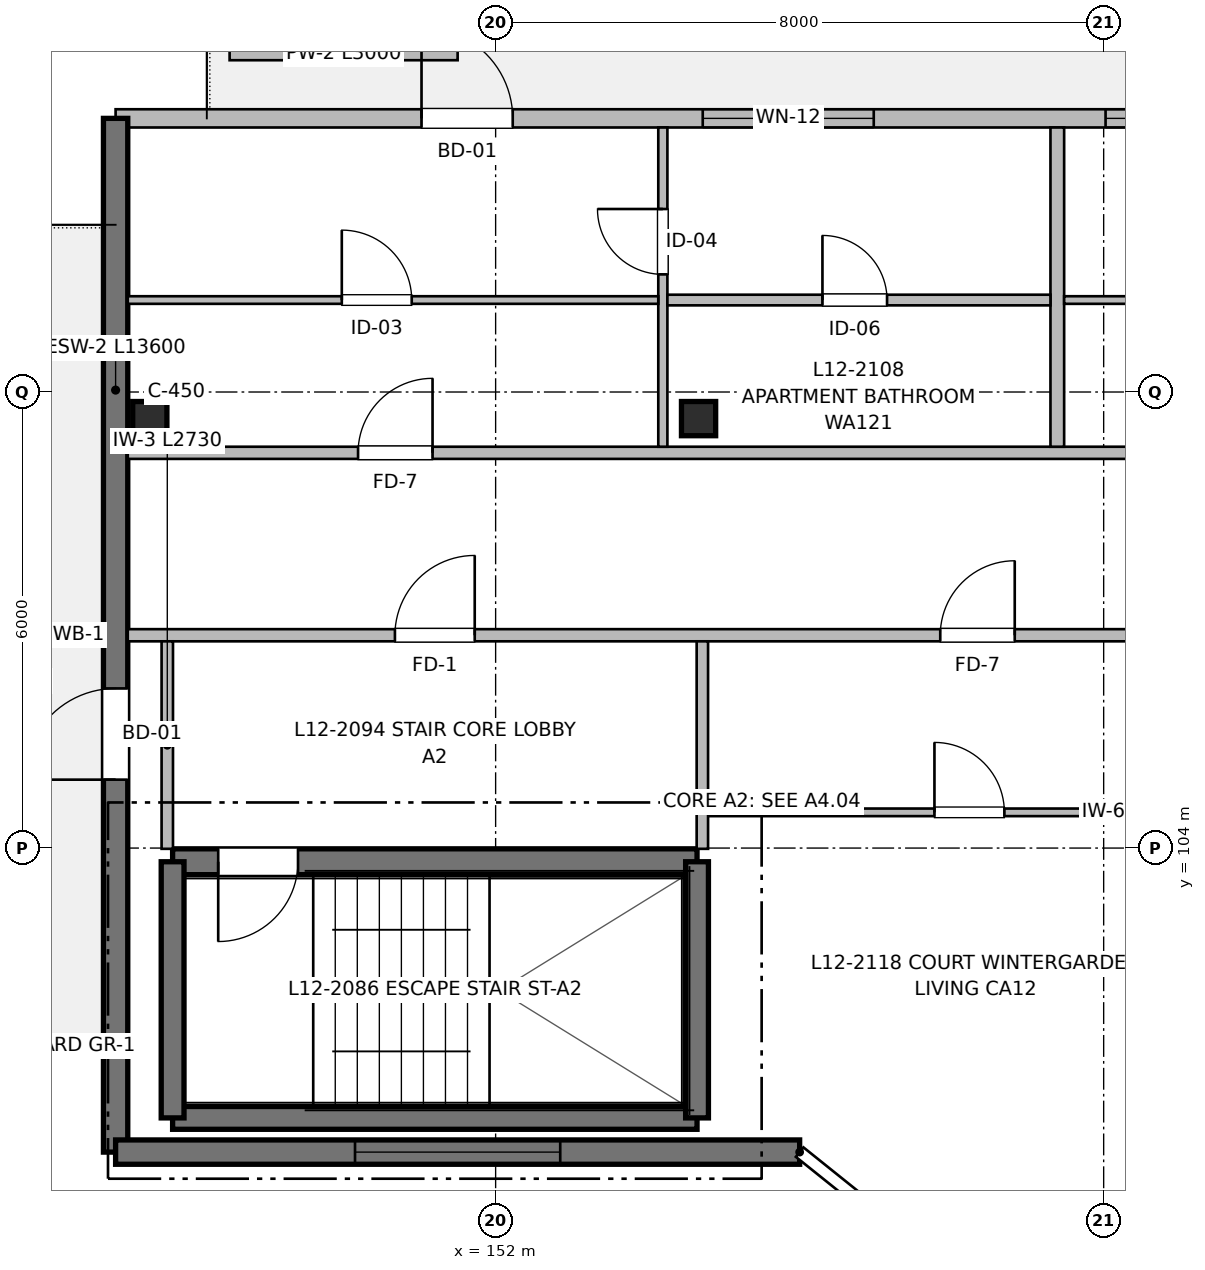
"""IFC4 building model, lengths in metres.
Left out: names, types, materials, properties, quantities, classifications, styles, units other than length and angle.
Written with IfcOpenShell. Run it as: python <this file> out.ifc"""

import sys

from ifc_helpers import new_model, si_unit, direction, frame, frame_2d, origin, origin_2d, place, context, subcontext, project, spatial, rectangle, extrude, element, fill, save


model = new_model("IFC4")
c1 = context("Model", 3, precision=1e-05, world=origin(), true_north=direction((0.0, 1.0)))
c2 = subcontext(c1, "Body", "Model", "MODEL_VIEW")
j1 = project(units=[si_unit("LENGTHUNIT", "METRE"), si_unit("PLANEANGLEUNIT", "RADIAN")], contexts=[c1])
p1 = place(None, origin())
s1 = spatial("IfcSite", under=j1, at=p1, CompositionType="ELEMENT")
p2 = place(p1, origin())
s2 = spatial("IfcBuilding", under=s1, at=p2, CompositionType="ELEMENT")
p3 = place(p2, frame((0.0, 0.0, 39.36)))
s3 = spatial("IfcBuildingStorey", under=s2, at=p3, CompositionType="ELEMENT", Elevation=39.36)
for number, where, z_axis, x_axis in (
    (1, (147.45, 109.65, 0.0), (0.0, 0.0, 1.0), (1.0, 0.0, 0.0)),
    (2, (154.67, 109.65, 0.0), (0.0, 0.0, 1.0), (1.0, 0.0, 0.0)),
):
    element("IfcColumn", number, at=place(p3, frame(where, z_axis=z_axis, x_axis=x_axis)), inside=s3, PredefinedType="COLUMN", context=c2, shape_type="SweptSolid", body=[
        extrude(rectangle(XDim=0.45, YDim=0.45, at=origin_2d()), origin(), (0.0, 0.0, 1.0), 3.2),
    ])
p4 = place(p3, frame((147.75, 100.45, 0.0), z_axis=(0.0, 0.0, 1.0), x_axis=(1.0, 0.0, 0.0)))
e3 = element("IfcWall", 3, at=p4, inside=s3, PredefinedType="SHEAR", context=c2, shape_type="SweptSolid", body=[
    extrude(rectangle(XDim=6.9, YDim=0.3, at=frame_2d((3.45, 0.0))), origin(), (0.0, 0.0, 1.0), 3.2),
])
p5 = place(p3, frame((154.65, 103.82, 0.0), z_axis=(0.0, 0.0, 1.0), x_axis=(-1.0, 0.0, 0.0)))
e4 = element("IfcWall", 4, at=p5, inside=s3, PredefinedType="SHEAR", context=c2, shape_type="SweptSolid", body=[
    extrude(rectangle(XDim=6.9, YDim=0.34, at=frame_2d((3.45, 0.0))), origin(), (0.0, 0.0, 1.0), 3.2),
])
p6 = place(p5, frame((5.25, 0.0, 0.0)))
e5 = element("IfcOpeningElement", 5, at=p6, cuts=e4, PredefinedType="OPENING", context=c2, shape_type="SweptSolid", body=[
    extrude(rectangle(XDim=1.05, YDim=2.15, at=frame_2d((0.525, 1.075))), frame((0.0, 0.18, 0.0), z_axis=(0.0, -1.0, 0.0), x_axis=(1.0, 0.0, 0.0)), (0.0, 0.0, 1.0), 0.36),
])
for number, where, z_axis, x_axis in (
    (6, (147.75, 103.82, 0.0), (0.0, 0.0, 1.0), (0.0, -1.0, 0.0)),
    (7, (154.65, 100.45, 0.0), (0.0, 0.0, 1.0), (0.0, 1.0, 0.0)),
):
    element("IfcWall", number, at=place(p3, frame(where, z_axis=z_axis, x_axis=x_axis)), inside=s3, PredefinedType="SHEAR", context=c2, shape_type="SweptSolid", body=[
        extrude(rectangle(XDim=3.37, YDim=0.3, at=frame_2d((1.685, 0.0))), origin(), (0.0, 0.0, 1.0), 3.2),
    ])
p7 = place(p3, frame((147.0, 113.6, 0.0), z_axis=(0.0, 0.0, 1.0), x_axis=(1.0, 0.0, 0.0)))
e8 = element("IfcWall", 8, at=p7, inside=s3, PredefinedType="SOLIDWALL", context=c2, shape_type="SweptSolid", body=[
    extrude(rectangle(XDim=37.0, YDim=0.24, at=frame_2d((18.5, 0.0))), origin(), (0.0, 0.0, 1.0), 2.98),
])
p8 = place(p7, frame((4.025, 0.0, 0.0)))
e9 = element("IfcOpeningElement", 9, at=p8, cuts=e8, PredefinedType="OPENING", context=c2, shape_type="SweptSolid", body=[
    extrude(rectangle(XDim=1.2, YDim=2.2, at=frame_2d((0.6, 1.1))), frame((0.0, 0.13, 0.0), z_axis=(0.0, -1.0, 0.0), x_axis=(1.0, 0.0, 0.0)), (0.0, 0.0, 1.0), 0.26),
])
p9 = place(p7, frame((7.725, 0.0, 0.72)))
e10 = element("IfcOpeningElement", 10, at=p9, cuts=e8, PredefinedType="OPENING", context=c2, shape_type="SweptSolid", body=[
    extrude(rectangle(XDim=2.25, YDim=1.5, at=frame_2d((1.125, 0.75))), frame((0.0, 0.13, 0.0), z_axis=(0.0, -1.0, 0.0), x_axis=(1.0, 0.0, 0.0)), (0.0, 0.0, 1.0), 0.26),
])
p10 = place(p7, frame((13.025, 0.0, 0.72)))
e11 = element("IfcOpeningElement", 11, at=p10, cuts=e8, PredefinedType="OPENING", context=c2, shape_type="SweptSolid", body=[
    extrude(rectangle(XDim=1.7, YDim=1.5, at=frame_2d((0.85, 0.75))), frame((0.0, 0.13, 0.0), z_axis=(0.0, -1.0, 0.0), x_axis=(1.0, 0.0, 0.0)), (0.0, 0.0, 1.0), 0.26),
])
p11 = place(p7, frame((22.525, 0.0, 0.0)))
e12 = element("IfcOpeningElement", 12, at=p11, cuts=e8, PredefinedType="OPENING", context=c2, shape_type="SweptSolid", body=[
    extrude(rectangle(XDim=1.2, YDim=2.2, at=frame_2d((0.6, 1.1))), frame((0.0, 0.13, 0.0), z_axis=(0.0, -1.0, 0.0), x_axis=(1.0, 0.0, 0.0)), (0.0, 0.0, 1.0), 0.26),
])
p12 = place(p7, frame((24.875, 0.0, 0.9)))
e13 = element("IfcOpeningElement", 13, at=p12, cuts=e8, PredefinedType="OPENING", context=c2, shape_type="SweptSolid", body=[
    extrude(rectangle(XDim=1.2, YDim=1.05, at=frame_2d((0.6, 0.525))), frame((0.0, 0.13, 0.0), z_axis=(0.0, -1.0, 0.0), x_axis=(1.0, 0.0, 0.0)), (0.0, 0.0, 1.0), 0.26),
])
p13 = place(p7, frame((32.1, 0.0, 0.77)))
e14 = element("IfcOpeningElement", 14, at=p13, cuts=e8, PredefinedType="OPENING", context=c2, shape_type="SweptSolid", body=[
    extrude(rectangle(XDim=1.45, YDim=1.45, at=frame_2d((0.725, 0.725))), frame((0.0, 0.13, 0.0), z_axis=(0.0, -1.0, 0.0), x_axis=(1.0, 0.0, 0.0)), (0.0, 0.0, 1.0), 0.26),
])
p14 = place(p3, frame((147.0, 100.0, 0.0), z_axis=(0.0, 0.0, 1.0), x_axis=(0.0, 1.0, 0.0)))
e15 = element("IfcWall", 15, at=p14, inside=s3, PredefinedType="SHEAR", context=c2, shape_type="SweptSolid", body=[
    extrude(rectangle(XDim=13.6, YDim=0.32, at=frame_2d((6.8, 0.0))), origin(), (0.0, 0.0, 1.0), 2.98),
])
p15 = place(p14, frame((4.9, 0.0, 0.0)))
e16 = element("IfcOpeningElement", 16, at=p15, cuts=e15, PredefinedType="OPENING", context=c2, shape_type="SweptSolid", body=[
    extrude(rectangle(XDim=1.2, YDim=2.2, at=frame_2d((0.6, 1.1))), frame((0.0, 0.17, 0.0), z_axis=(0.0, -1.0, 0.0), x_axis=(1.0, 0.0, 0.0)), (0.0, 0.0, 1.0), 0.34),
])
p16 = place(p3, frame((156.0, 100.0, 0.0), z_axis=(0.0, 0.0, 1.0), x_axis=(-1.0, 0.0, 0.0)))
e17 = element("IfcWall", 17, at=p16, inside=s3, PredefinedType="SHEAR", context=c2, shape_type="SweptSolid", body=[
    extrude(rectangle(XDim=9.0, YDim=0.32, at=frame_2d((4.5, 0.0))), origin(), (0.0, 0.0, 1.0), 2.98),
])
p17 = place(p16, frame((3.15, 0.0, 0.47)))
e18 = element("IfcOpeningElement", 18, at=p17, cuts=e17, PredefinedType="OPENING", context=c2, shape_type="SweptSolid", body=[
    extrude(rectangle(XDim=2.7, YDim=1.75, at=frame_2d((1.35, 0.875))), frame((0.0, 0.17, 0.0), z_axis=(0.0, -1.0, 0.0), x_axis=(1.0, 0.0, 0.0)), (0.0, 0.0, 1.0), 0.34),
])
p18 = place(p3, frame((148.5, 114.45, 0.0), z_axis=(0.0, 0.0, 1.0), x_axis=(1.0, 0.0, 0.0)))
e19 = element("IfcWall", 19, at=p18, inside=s3, PredefinedType="PARAPET", context=c2, shape_type="SweptSolid", body=[
    extrude(rectangle(XDim=3.0, YDim=0.17, at=frame_2d((1.5, 0.0))), origin(), (0.0, 0.0, 1.0), 0.45),
])
p19 = place(p3, frame((147.16, 106.8, 0.0), z_axis=(0.0, 0.0, 1.0), x_axis=(1.0, 0.0, 0.0)))
e20 = element("IfcWall", 20, at=p19, inside=s3, PredefinedType="PARTITIONING", context=c2, shape_type="SweptSolid", body=[
    extrude(rectangle(XDim=27.64, YDim=0.16, at=frame_2d((13.82, 0.0))), origin(), (0.0, 0.0, 1.0), 2.935),
])
p20 = place(p19, frame((3.515, 0.0, 0.0)))
e21 = element("IfcOpeningElement", 21, at=p20, cuts=e20, PredefinedType="OPENING", context=c2, shape_type="SweptSolid", body=[
    extrude(rectangle(XDim=1.05, YDim=2.15, at=frame_2d((0.525, 1.075))), frame((0.0, 0.09, 0.0), z_axis=(0.0, -1.0, 0.0), x_axis=(1.0, 0.0, 0.0)), (0.0, 0.0, 1.0), 0.18),
])
p21 = place(p19, frame((10.69, 0.0, 0.0)))
e22 = element("IfcOpeningElement", 22, at=p21, cuts=e20, PredefinedType="OPENING", context=c2, shape_type="SweptSolid", body=[
    extrude(rectangle(XDim=0.98, YDim=2.15, at=frame_2d((0.49, 1.075))), frame((0.0, 0.09, 0.0), z_axis=(0.0, -1.0, 0.0), x_axis=(1.0, 0.0, 0.0)), (0.0, 0.0, 1.0), 0.18),
])
p22 = place(p3, frame((147.16, 109.2, 0.0), z_axis=(0.0, 0.0, 1.0), x_axis=(1.0, 0.0, 0.0)))
e23 = element("IfcWall", 23, at=p22, inside=s3, PredefinedType="PARTITIONING", context=c2, shape_type="SweptSolid", body=[
    extrude(rectangle(XDim=36.68, YDim=0.16, at=frame_2d((18.34, 0.0))), origin(), (0.0, 0.0, 1.0), 2.935),
])
p23 = place(p22, frame((3.03, 0.0, 0.0)))
e24 = element("IfcOpeningElement", 24, at=p23, cuts=e23, PredefinedType="OPENING", context=c2, shape_type="SweptSolid", body=[
    extrude(rectangle(XDim=0.98, YDim=2.15, at=frame_2d((0.49, 1.075))), frame((0.0, 0.09, 0.0), z_axis=(0.0, -1.0, 0.0), x_axis=(1.0, 0.0, 0.0)), (0.0, 0.0, 1.0), 0.18),
])
p24 = place(p22, frame((15.32, 0.0, 0.0)))
e25 = element("IfcOpeningElement", 25, at=p24, cuts=e23, PredefinedType="OPENING", context=c2, shape_type="SweptSolid", body=[
    extrude(rectangle(XDim=0.98, YDim=2.15, at=frame_2d((0.49, 1.075))), frame((0.0, 0.09, 0.0), z_axis=(0.0, -1.0, 0.0), x_axis=(1.0, 0.0, 0.0)), (0.0, 0.0, 1.0), 0.18),
])
p25 = place(p22, frame((27.57, 0.0, 0.0)))
e26 = element("IfcOpeningElement", 26, at=p25, cuts=e23, PredefinedType="OPENING", context=c2, shape_type="SweptSolid", body=[
    extrude(rectangle(XDim=0.98, YDim=2.15, at=frame_2d((0.49, 1.075))), frame((0.0, 0.09, 0.0), z_axis=(0.0, -1.0, 0.0), x_axis=(1.0, 0.0, 0.0)), (0.0, 0.0, 1.0), 0.18),
])
for number, where, z_axis, x_axis in (
    (27, (147.68, 103.99, 0.0), (0.0, 0.0, 1.0), (0.0, 1.0, 0.0)),
    (28, (154.72, 103.99, 0.0), (0.0, 0.0, 1.0), (0.0, 1.0, 0.0)),
):
    element("IfcWall", number, at=place(p3, frame(where, z_axis=z_axis, x_axis=x_axis)), inside=s3, PredefinedType="PARTITIONING", context=c2, shape_type="SweptSolid", body=[
        extrude(rectangle(XDim=2.73, YDim=0.15, at=frame_2d((1.365, 0.0))), origin(), (0.0, 0.0, 1.0), 2.935),
    ])
p26 = place(p3, frame((159.39, 109.28, 0.0), z_axis=(0.0, 0.0, 1.0), x_axis=(0.0, 1.0, 0.0)))
e29 = element("IfcWall", 29, at=p26, inside=s3, PredefinedType="PARTITIONING", context=c2, shape_type="SweptSolid", body=[
    extrude(rectangle(XDim=4.2, YDim=0.18, at=frame_2d((2.1, 0.0))), origin(), (0.0, 0.0, 1.0), 2.935),
])
p27 = place(p3, frame((154.2, 109.28, 0.0), z_axis=(0.0, 0.0, 1.0), x_axis=(0.0, 1.0, 0.0)))
e30 = element("IfcWall", 30, at=p27, inside=s3, PredefinedType="PARTITIONING", context=c2, shape_type="SweptSolid", body=[
    extrude(rectangle(XDim=4.2, YDim=0.12, at=frame_2d((2.1, 0.0))), origin(), (0.0, 0.0, 1.0), 2.935),
])
p28 = place(p27, frame((2.268, 0.0, 0.0)))
e31 = element("IfcOpeningElement", 31, at=p28, cuts=e30, PredefinedType="OPENING", context=c2, shape_type="SweptSolid", body=[
    extrude(rectangle(XDim=0.86, YDim=2.1, at=frame_2d((0.43, 1.05))), frame((0.0, 0.07, 0.0), z_axis=(0.0, -1.0, 0.0), x_axis=(1.0, 0.0, 0.0)), (0.0, 0.0, 1.0), 0.14),
])
p29 = place(p3, frame((154.26, 111.21, 0.0), z_axis=(0.0, 0.0, 1.0), x_axis=(1.0, 0.0, 0.0)))
e32 = element("IfcWall", 32, at=p29, inside=s3, PredefinedType="PARTITIONING", context=c2, shape_type="SweptSolid", body=[
    extrude(rectangle(XDim=5.04, YDim=0.14, at=frame_2d((2.52, 0.0))), origin(), (0.0, 0.0, 1.0), 2.935),
])
p30 = place(p29, frame((2.04, 0.0, 0.0)))
e33 = element("IfcOpeningElement", 33, at=p30, cuts=e32, PredefinedType="OPENING", context=c2, shape_type="SweptSolid", body=[
    extrude(rectangle(XDim=0.85, YDim=2.05, at=frame_2d((0.425, 1.025))), frame((0.0, 0.08, 0.0), z_axis=(0.0, -1.0, 0.0), x_axis=(1.0, 0.0, 0.0)), (0.0, 0.0, 1.0), 0.16),
])
p31 = place(p3, frame((147.16, 111.21, 0.0), z_axis=(0.0, 0.0, 1.0), x_axis=(1.0, 0.0, 0.0)))
e34 = element("IfcWall", 34, at=p31, inside=s3, PredefinedType="PARTITIONING", context=c2, shape_type="SweptSolid", body=[
    extrude(rectangle(XDim=6.98, YDim=0.1, at=frame_2d((3.49, 0.0))), origin(), (0.0, 0.0, 1.0), 2.935),
])
p32 = place(p31, frame((2.816, 0.0, 0.0)))
e35 = element("IfcOpeningElement", 35, at=p32, cuts=e34, PredefinedType="OPENING", context=c2, shape_type="SweptSolid", body=[
    extrude(rectangle(XDim=0.92, YDim=2.1, at=frame_2d((0.46, 1.05))), frame((0.0, 0.06, 0.0), z_axis=(0.0, -1.0, 0.0), x_axis=(1.0, 0.0, 0.0)), (0.0, 0.0, 1.0), 0.12),
])
p33 = place(p3, frame((159.48, 111.21, 0.0), z_axis=(0.0, 0.0, 1.0), x_axis=(1.0, 0.0, 0.0)))
e36 = element("IfcWall", 36, at=p33, inside=s3, PredefinedType="PARTITIONING", context=c2, shape_type="SweptSolid", body=[
    extrude(rectangle(XDim=6.92, YDim=0.1, at=frame_2d((3.46, 0.0))), origin(), (0.0, 0.0, 1.0), 2.935),
])
p34 = place(p33, frame((3.192, 0.0, 0.0)))
e37 = element("IfcOpeningElement", 37, at=p34, cuts=e36, PredefinedType="OPENING", context=c2, shape_type="SweptSolid", body=[
    extrude(rectangle(XDim=0.92, YDim=2.1, at=frame_2d((0.46, 1.05))), frame((0.0, 0.06, 0.0), z_axis=(0.0, -1.0, 0.0), x_axis=(1.0, 0.0, 0.0)), (0.0, 0.0, 1.0), 0.12),
])
p35 = place(p3, frame((154.8, 104.47, 0.0), z_axis=(0.0, 0.0, 1.0), x_axis=(1.0, 0.0, 0.0)))
e38 = element("IfcWall", 38, at=p35, inside=s3, PredefinedType="PARTITIONING", context=c2, shape_type="SweptSolid", body=[
    extrude(rectangle(XDim=7.02, YDim=0.1, at=frame_2d((3.51, 0.0))), origin(), (0.0, 0.0, 1.0), 2.935),
])
p36 = place(p35, frame((2.974, 0.0, 0.0)))
e39 = element("IfcOpeningElement", 39, at=p36, cuts=e38, PredefinedType="OPENING", context=c2, shape_type="SweptSolid", body=[
    extrude(rectangle(XDim=0.92, YDim=2.1, at=frame_2d((0.46, 1.05))), frame((0.0, 0.06, 0.0), z_axis=(0.0, -1.0, 0.0), x_axis=(1.0, 0.0, 0.0)), (0.0, 0.0, 1.0), 0.12),
])
p37 = place(p6, origin())
e40 = element("IfcDoor", 40, at=p37, inside=s3, OperationType="SINGLE_SWING_RIGHT", PredefinedType="DOOR", context=c2, shape_type="SweptSolid", body=[
    extrude(rectangle(XDim=1.05, YDim=2.15, at=frame_2d((0.525, 1.075))), frame((0.0, 0.025, 0.0), z_axis=(0.0, -1.0, 0.0), x_axis=(1.0, 0.0, 0.0)), (0.0, 0.0, 1.0), 0.05),
])
fill(e5, e40)
p38 = place(p8, origin())
e41 = element("IfcDoor", 41, at=p38, inside=s3, OperationType="SINGLE_SWING_LEFT", PredefinedType="DOOR", context=c2, shape_type="SweptSolid", body=[
    extrude(rectangle(XDim=1.2, YDim=2.2, at=frame_2d((0.6, 1.1))), frame((0.0, 0.025, 0.0), z_axis=(0.0, -1.0, 0.0), x_axis=(1.0, 0.0, 0.0)), (0.0, 0.0, 1.0), 0.05),
])
fill(e9, e41)
p39 = place(p9, origin())
e42 = element("IfcWindow", 42, at=p39, inside=s3, PartitioningType="SINGLE_PANEL", PredefinedType="WINDOW", context=c2, shape_type="SweptSolid", body=[
    extrude(rectangle(XDim=2.25, YDim=1.5, at=frame_2d((1.125, 0.75))), frame((0.0, 0.03, 0.0), z_axis=(0.0, -1.0, 0.0), x_axis=(1.0, 0.0, 0.0)), (0.0, 0.0, 1.0), 0.06),
])
fill(e10, e42)
p40 = place(p10, origin())
e43 = element("IfcWindow", 43, at=p40, inside=s3, PartitioningType="SINGLE_PANEL", PredefinedType="WINDOW", context=c2, shape_type="SweptSolid", body=[
    extrude(rectangle(XDim=1.7, YDim=1.5, at=frame_2d((0.85, 0.75))), frame((0.0, 0.03, 0.0), z_axis=(0.0, -1.0, 0.0), x_axis=(1.0, 0.0, 0.0)), (0.0, 0.0, 1.0), 0.06),
])
fill(e11, e43)
p41 = place(p15, origin())
e44 = element("IfcDoor", 44, at=p41, inside=s3, OperationType="SINGLE_SWING_LEFT", PredefinedType="DOOR", context=c2, shape_type="SweptSolid", body=[
    extrude(rectangle(XDim=1.2, YDim=2.2, at=frame_2d((0.6, 1.1))), frame((0.0, 0.025, 0.0), z_axis=(0.0, -1.0, 0.0), x_axis=(1.0, 0.0, 0.0)), (0.0, 0.0, 1.0), 0.05),
])
fill(e16, e44)
p42 = place(p17, origin())
e45 = element("IfcWindow", 45, at=p42, inside=s3, PartitioningType="SINGLE_PANEL", PredefinedType="WINDOW", context=c2, shape_type="SweptSolid", body=[
    extrude(rectangle(XDim=2.7, YDim=1.75, at=frame_2d((1.35, 0.875))), frame((0.0, 0.03, 0.0), z_axis=(0.0, -1.0, 0.0), x_axis=(1.0, 0.0, 0.0)), (0.0, 0.0, 1.0), 0.06),
])
fill(e18, e45)
p43 = place(p20, origin())
e46 = element("IfcDoor", 46, at=p43, inside=s3, OperationType="SINGLE_SWING_RIGHT", PredefinedType="DOOR", context=c2, shape_type="SweptSolid", body=[
    extrude(rectangle(XDim=1.05, YDim=2.15, at=frame_2d((0.525, 1.075))), frame((0.0, 0.025, 0.0), z_axis=(0.0, -1.0, 0.0), x_axis=(1.0, 0.0, 0.0)), (0.0, 0.0, 1.0), 0.05),
])
fill(e21, e46)
p44 = place(p23, origin())
e47 = element("IfcDoor", 47, at=p44, inside=s3, OperationType="SINGLE_SWING_RIGHT", PredefinedType="DOOR", context=c2, shape_type="SweptSolid", body=[
    extrude(rectangle(XDim=0.98, YDim=2.15, at=frame_2d((0.49, 1.075))), frame((0.0, 0.025, 0.0), z_axis=(0.0, -1.0, 0.0), x_axis=(1.0, 0.0, 0.0)), (0.0, 0.0, 1.0), 0.05),
])
fill(e24, e47)
p45 = place(p32, origin())
e48 = element("IfcDoor", 48, at=p45, inside=s3, OperationType="SINGLE_SWING_LEFT", PredefinedType="DOOR", context=c2, shape_type="SweptSolid", body=[
    extrude(rectangle(XDim=0.92, YDim=2.1, at=frame_2d((0.46, 1.05))), frame((0.0, 0.025, 0.0), z_axis=(0.0, -1.0, 0.0), x_axis=(1.0, 0.0, 0.0)), (0.0, 0.0, 1.0), 0.05),
])
fill(e35, e48)
p46 = place(p28, origin())
e49 = element("IfcDoor", 49, at=p46, inside=s3, OperationType="SINGLE_SWING_RIGHT", PredefinedType="DOOR", context=c2, shape_type="SweptSolid", body=[
    extrude(rectangle(XDim=0.86, YDim=2.1, at=frame_2d((0.43, 1.05))), frame((0.0, 0.025, 0.0), z_axis=(0.0, -1.0, 0.0), x_axis=(1.0, 0.0, 0.0)), (0.0, 0.0, 1.0), 0.05),
])
fill(e31, e49)
p47 = place(p30, origin())
e50 = element("IfcDoor", 50, at=p47, inside=s3, OperationType="SINGLE_SWING_LEFT", PredefinedType="DOOR", context=c2, shape_type="SweptSolid", body=[
    extrude(rectangle(XDim=0.85, YDim=2.05, at=frame_2d((0.425, 1.025))), frame((0.0, 0.025, 0.0), z_axis=(0.0, -1.0, 0.0), x_axis=(1.0, 0.0, 0.0)), (0.0, 0.0, 1.0), 0.05),
])
fill(e33, e50)
p48 = place(p21, origin())
e51 = element("IfcDoor", 51, at=p48, inside=s3, OperationType="SINGLE_SWING_RIGHT", PredefinedType="DOOR", context=c2, shape_type="SweptSolid", body=[
    extrude(rectangle(XDim=0.98, YDim=2.15, at=frame_2d((0.49, 1.075))), frame((0.0, 0.025, 0.0), z_axis=(0.0, -1.0, 0.0), x_axis=(1.0, 0.0, 0.0)), (0.0, 0.0, 1.0), 0.05),
])
fill(e22, e51)
p49 = place(p36, origin())
e52 = element("IfcDoor", 52, at=p49, inside=s3, OperationType="SINGLE_SWING_LEFT", PredefinedType="DOOR", context=c2, shape_type="SweptSolid", body=[
    extrude(rectangle(XDim=0.92, YDim=2.1, at=frame_2d((0.46, 1.05))), frame((0.0, 0.025, 0.0), z_axis=(0.0, -1.0, 0.0), x_axis=(1.0, 0.0, 0.0)), (0.0, 0.0, 1.0), 0.05),
])
fill(e39, e52)
save(model, sys.argv[1])
